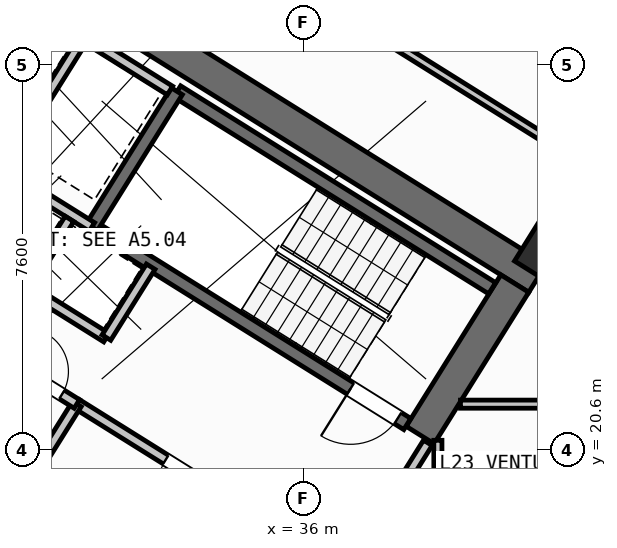
"""IFC4 building model, lengths in metres.
Left out: names, types, materials, properties, quantities, classifications, styles, units other than length and angle.
Written with IfcOpenShell. Run it as: python <this file> out.ifc"""

import sys

from ifc_helpers import new_model, si_unit, direction, frame, frame_2d, origin, origin_2d, place, context, subcontext, project, spatial, rectangle, hollow_rectangle, extrude, source, transform, mapped, element, fill, save


model = new_model("IFC4")
c1 = context("Model", 3, precision=1e-05, world=origin(), true_north=direction((0.0, 1.0)))
c2 = subcontext(c1, "Body", "Model", "MODEL_VIEW")
j1 = project(units=[si_unit("LENGTHUNIT", "METRE"), si_unit("PLANEANGLEUNIT", "RADIAN")], contexts=[c1])
p1 = place(None, origin())
s1 = spatial("IfcSite", under=j1, at=p1, CompositionType="ELEMENT")
p2 = place(p1, origin())
s2 = spatial("IfcBuilding", under=s1, at=p2, CompositionType="ELEMENT")
p3 = place(p2, frame((0.0, 0.0, 93.6)))
s3 = spatial("IfcBuildingStorey", under=s2, at=p3, CompositionType="ELEMENT", Elevation=93.6)
p4 = place(p3, frame((40.615, 23.983, 0.0), z_axis=(0.0, 0.0, 1.0), x_axis=(-0.848045953968, 0.529922692436, 0.0)))
e1 = element("IfcWall", 1, at=p4, inside=s3, PredefinedType="SHEAR", context=c2, shape_type="SweptSolid", body=[
    extrude(rectangle(XDim=13.24, YDim=0.65, at=frame_2d((6.62, 0.0))), origin(), (0.0, 0.0, 1.0), 3.35),
])
p5 = place(p3, frame((40.168, 23.88, 0.0), z_axis=(0.0, 0.0, 1.0), x_axis=(-0.529893103397, -0.8480644427, 0.0)))
e2 = element("IfcWall", 2, at=p5, inside=s3, PredefinedType="SHEAR", context=c2, shape_type="SweptSolid", body=[
    extrude(rectangle(XDim=3.525, YDim=0.65, at=frame_2d((1.763, 0.0))), origin(), (0.0, 0.0, 1.0), 3.35),
])
m1 = source(origin(), c2, "Body", "SweptSolid", [
    extrude(hollow_rectangle(XDim=0.9, YDim=0.9, WallThickness=0.036, at=origin_2d()), origin(), (0.0, 0.0, 1.0), 3.6),
])
p6 = place(p3, frame((40.783, 24.469, 0.0), z_axis=(0.0, 0.0, 1.0), x_axis=(-0.848048096156, 0.529919264233, 0.0)))
e3 = element("IfcColumn", 3, at=p6, inside=s3, PredefinedType="COLUMN", context=c2, shape_type="MappedRepresentation", body=[
    mapped(m1, transform((0.0, 0.0, 0.0), scale=1.0)),
])
p7 = place(p3, frame((31.76, 12.183, 0.0), z_axis=(0.0, 0.0, 1.0), x_axis=(-0.848047074256, 0.529920899612, 0.0)))
e4 = element("IfcWall", 4, at=p7, inside=s3, PredefinedType="STANDARD", context=c2, shape_type="SweptSolid", body=[
    extrude(rectangle(XDim=30.652, YDim=0.32, at=frame_2d((15.326, 0.0))), origin(), (0.0, 0.0, 1.0), 3.35),
])
p8 = place(p7, frame((15.153, 0.0, 0.0)))
e5 = element("IfcOpeningElement", 5, at=p8, cuts=e4, PredefinedType="OPENING", context=c2, shape_type="SweptSolid", body=[
    extrude(rectangle(XDim=1.2, YDim=2.15, at=frame_2d((0.6, 1.075))), frame((0.0, 0.17, 0.0), z_axis=(0.0, -1.0, 0.0), x_axis=(1.0, 0.0, 0.0)), (0.0, 0.0, 1.0), 0.34),
])
p9 = place(p7, frame((2.002, 0.0, 0.8)))
e6 = element("IfcOpeningElement", 6, at=p9, cuts=e4, PredefinedType="OPENING", context=c2, shape_type="SweptSolid", body=[
    extrude(rectangle(XDim=2.1, YDim=1.55, at=frame_2d((1.05, 0.775))), frame((0.0, 0.17, 0.0), z_axis=(0.0, -1.0, 0.0), x_axis=(1.0, 0.0, 0.0)), (0.0, 0.0, 1.0), 0.34),
])
p10 = place(p7, frame((7.206, 0.0, 0.8)))
e7 = element("IfcOpeningElement", 7, at=p10, cuts=e4, PredefinedType="OPENING", context=c2, shape_type="SweptSolid", body=[
    extrude(rectangle(XDim=2.1, YDim=1.55, at=frame_2d((1.05, 0.775))), frame((0.0, 0.17, 0.0), z_axis=(0.0, -1.0, 0.0), x_axis=(1.0, 0.0, 0.0)), (0.0, 0.0, 1.0), 0.34),
])
p11 = place(p7, frame((12.648, 0.0, 1.0)))
e8 = element("IfcOpeningElement", 8, at=p11, cuts=e4, PredefinedType="OPENING", context=c2, shape_type="SweptSolid", body=[
    extrude(rectangle(XDim=0.9, YDim=1.25, at=frame_2d((0.45, 0.625))), frame((0.0, 0.17, 0.0), z_axis=(0.0, -1.0, 0.0), x_axis=(1.0, 0.0, 0.0)), (0.0, 0.0, 1.0), 0.34),
])
p12 = place(p7, frame((27.974, 0.0, 0.95)))
e9 = element("IfcOpeningElement", 9, at=p12, cuts=e4, PredefinedType="OPENING", context=c2, shape_type="SweptSolid", body=[
    extrude(rectangle(XDim=1.2, YDim=1.4, at=frame_2d((0.6, 0.7))), frame((0.0, 0.17, 0.0), z_axis=(0.0, -1.0, 0.0), x_axis=(1.0, 0.0, 0.0)), (0.0, 0.0, 1.0), 0.34),
])
p13 = place(p7, frame((18.347, 0.0, 1.0)))
e10 = element("IfcOpeningElement", 10, at=p13, cuts=e4, PredefinedType="OPENING", context=c2, shape_type="SweptSolid", body=[
    extrude(rectangle(XDim=0.9, YDim=1.25, at=frame_2d((0.45, 0.625))), frame((0.0, 0.17, 0.0), z_axis=(0.0, -1.0, 0.0), x_axis=(1.0, 0.0, 0.0)), (0.0, 0.0, 1.0), 0.34),
])
p14 = place(p7, frame((20.931, 0.0, 1.0)))
e11 = element("IfcOpeningElement", 11, at=p14, cuts=e4, PredefinedType="OPENING", context=c2, shape_type="SweptSolid", body=[
    extrude(rectangle(XDim=0.65, YDim=1.15, at=frame_2d((0.325, 0.575))), frame((0.0, 0.17, 0.0), z_axis=(0.0, -1.0, 0.0), x_axis=(1.0, 0.0, 0.0)), (0.0, 0.0, 1.0), 0.34),
])
p15 = place(p7, frame((22.938, 0.0, 1.0)))
e12 = element("IfcOpeningElement", 12, at=p15, cuts=e4, PredefinedType="OPENING", context=c2, shape_type="SweptSolid", body=[
    extrude(rectangle(XDim=0.9, YDim=1.25, at=frame_2d((0.45, 0.625))), frame((0.0, 0.17, 0.0), z_axis=(0.0, -1.0, 0.0), x_axis=(1.0, 0.0, 0.0)), (0.0, 0.0, 1.0), 0.34),
])
p16 = place(p7, frame((25.069, 0.0, 1.0)))
e13 = element("IfcOpeningElement", 13, at=p16, cuts=e4, PredefinedType="OPENING", context=c2, shape_type="SweptSolid", body=[
    extrude(rectangle(XDim=0.9, YDim=1.25, at=frame_2d((0.45, 0.625))), frame((0.0, 0.17, 0.0), z_axis=(0.0, -1.0, 0.0), x_axis=(1.0, 0.0, 0.0)), (0.0, 0.0, 1.0), 0.34),
])
p17 = place(p3, frame((31.28, 18.261, 0.0), z_axis=(0.0, 0.0, 1.0), x_axis=(-0.848051618787, 0.529913626805, 0.0)))
e14 = element("IfcWall", 14, at=p17, inside=s3, PredefinedType="SHEAR", context=c2, shape_type="SweptSolid", body=[
    extrude(rectangle(XDim=7.46, YDim=0.26, at=frame_2d((3.73, 0.0))), origin(), (0.0, 0.0, 1.0), 3.35),
])
p18 = place(p17, frame((0.36, 0.0, 0.0)))
e15 = element("IfcOpeningElement", 15, at=p18, cuts=e14, PredefinedType="OPENING", context=c2, shape_type="SweptSolid", body=[
    extrude(rectangle(XDim=0.86, YDim=2.05, at=frame_2d((0.43, 1.025))), frame((0.0, 0.14, 0.0), z_axis=(0.0, -1.0, 0.0), x_axis=(1.0, 0.0, 0.0)), (0.0, 0.0, 1.0), 0.28),
])
p19 = place(p3, frame((39.721, 23.788, 0.0), z_axis=(0.0, 0.0, 1.0), x_axis=(-0.848054434086, 0.529909121291, 0.0)))
e16 = element("IfcWall", 16, at=p19, inside=s3, PredefinedType="SHEAR", context=c2, shape_type="SweptSolid", body=[
    extrude(rectangle(XDim=7.33, YDim=0.26, at=frame_2d((3.665, 0.0))), origin(), (0.0, 0.0, 1.0), 3.35),
])
p20 = place(p3, frame((38.046, 21.108, 0.0), z_axis=(0.0, 0.0, 1.0), x_axis=(-0.848054434086, 0.529909121291, 0.0)))
e17 = element("IfcWall", 17, at=p20, inside=s3, PredefinedType="SHEAR", context=c2, shape_type="SweptSolid", body=[
    extrude(rectangle(XDim=7.33, YDim=0.26, at=frame_2d((3.665, 0.0))), origin(), (0.0, 0.0, 1.0), 3.35),
])
p21 = place(p20, frame((0.22, 0.0, 0.0)))
e18 = element("IfcOpeningElement", 18, at=p21, cuts=e17, PredefinedType="OPENING", context=c2, shape_type="SweptSolid", body=[
    extrude(rectangle(XDim=1.1, YDim=2.1, at=frame_2d((0.55, 1.05))), frame((0.0, 0.14, 0.0), z_axis=(0.0, -1.0, 0.0), x_axis=(1.0, 0.0, 0.0)), (0.0, 0.0, 1.0), 0.28),
])
p22 = place(p3, frame((33.496, 27.677, 0.0), z_axis=(0.0, 0.0, 1.0), x_axis=(-0.529908658664, -0.84805472316, 0.0)))
e19 = element("IfcWall", 19, at=p22, inside=s3, PredefinedType="SHEAR", context=c2, shape_type="SweptSolid", body=[
    extrude(rectangle(XDim=3.16, YDim=0.26, at=frame_2d((1.58, 0.0))), origin(), (0.0, 0.0, 1.0), 3.35),
])
p23 = place(p3, frame((36.374, 18.474, 0.0), z_axis=(0.0, 0.0, 1.0), x_axis=(-0.848051071577, 0.529914502535, 0.0)))
e20 = element("IfcWall", 20, at=p23, inside=s3, PredefinedType="STANDARD", context=c2, shape_type="SweptSolid", body=[
    extrude(rectangle(XDim=5.718, YDim=0.2, at=frame_2d((2.859, 0.0))), origin(), (0.0, 0.0, 1.0), 3.34),
])
p24 = place(p23, frame((2.498, 0.0, 0.0)))
e21 = element("IfcOpeningElement", 21, at=p24, cuts=e20, PredefinedType="OPENING", context=c2, shape_type="SweptSolid", body=[
    extrude(rectangle(XDim=1.15, YDim=2.1, at=frame_2d((0.575, 1.05))), frame((0.0, 0.11, 0.0), z_axis=(0.0, -1.0, 0.0), x_axis=(1.0, 0.0, 0.0)), (0.0, 0.0, 1.0), 0.22),
])
p25 = place(p3, frame((31.822, 24.998, 0.0), z_axis=(0.0, 0.0, 1.0), x_axis=(-0.848058348634, 0.529902856485, 0.0)))
e22 = element("IfcWall", 22, at=p25, inside=s3, PredefinedType="STANDARD", context=c2, shape_type="SweptSolid", body=[
    extrude(rectangle(XDim=4.568, YDim=0.2, at=frame_2d((2.284, 0.0))), origin(), (0.0, 0.0, 1.0), 3.34),
])
p26 = place(p3, frame((32.108, 22.814, 0.0), z_axis=(0.0, 0.0, 1.0), x_axis=(-0.848042229521, 0.529928652696, 0.0)))
e23 = element("IfcWall", 23, at=p26, inside=s3, PredefinedType="STANDARD", context=c2, shape_type="SweptSolid", body=[
    extrude(rectangle(XDim=5.62, YDim=0.2, at=frame_2d((2.81, 0.0))), origin(), (0.0, 0.0, 1.0), 3.34),
])
p27 = place(p3, frame((32.982, 24.213, 0.0), z_axis=(0.0, 0.0, 1.0), x_axis=(-0.529839334948, -0.84809803628, 0.0)))
e24 = element("IfcWall", 24, at=p27, inside=s3, PredefinedType="STANDARD", context=c2, shape_type="SweptSolid", body=[
    extrude(rectangle(XDim=1.65, YDim=0.2, at=frame_2d((0.825, 0.0))), origin(), (0.0, 0.0, 1.0), 3.34),
])
p28 = place(p3, frame((31.645, 28.716, 0.0), z_axis=(0.0, 0.0, 1.0), x_axis=(-0.52986693015, -0.848080795876, 0.0)))
e25 = element("IfcWall", 25, at=p28, inside=s3, PredefinedType="STANDARD", context=c2, shape_type="SweptSolid", body=[
    extrude(rectangle(XDim=2.66, YDim=0.2, at=frame_2d((1.33, 0.0))), origin(), (0.0, 0.0, 1.0), 3.34),
])
p29 = place(p3, frame((33.363, 27.69, 0.0), z_axis=(0.0, 0.0, 1.0), x_axis=(-0.848053806312, 0.529910125964, 0.0)))
e26 = element("IfcWall", 26, at=p29, inside=s3, PredefinedType="STANDARD", context=c2, shape_type="SweptSolid", body=[
    extrude(rectangle(XDim=4.448, YDim=0.2, at=frame_2d((2.224, 0.0))), origin(), (0.0, 0.0, 1.0), 3.34),
])
p30 = place(p3, frame((31.379, 25.156, 0.0), z_axis=(0.0, 0.0, 1.0), x_axis=(-0.529998940003, -0.847998304005, 0.0)))
e27 = element("IfcWall", 27, at=p30, inside=s3, PredefinedType="STANDARD", context=c2, shape_type="SweptSolid", body=[
    extrude(rectangle(XDim=1.58, YDim=0.2, at=frame_2d((0.79, 0.0))), origin(), (0.0, 0.0, 1.0), 3.34),
])
p31 = place(p3, frame((31.525, 21.504, 0.0), z_axis=(0.0, 0.0, 1.0), x_axis=(-0.529907497854, -0.848055448493, 0.0)))
e28 = element("IfcWall", 28, at=p31, inside=s3, PredefinedType="STANDARD", context=c2, shape_type="SweptSolid", body=[
    extrude(rectangle(XDim=2.88, YDim=0.2, at=frame_2d((1.44, 0.0))), origin(), (0.0, 0.0, 1.0), 3.34),
])
p32 = place(p3, frame((31.525, 21.504, 0.0), z_axis=(0.0, 0.0, 1.0), x_axis=(-0.848044998614, 0.529924221305, 0.0)))
e29 = element("IfcWall", 29, at=p32, inside=s3, PredefinedType="STANDARD", context=c2, shape_type="SweptSolid", body=[
    extrude(rectangle(XDim=6.168, YDim=0.2, at=frame_2d((3.084, 0.0))), origin(), (0.0, 0.0, 1.0), 3.34),
])
p33 = place(p32, frame((4.4, 0.0, 0.0)))
e30 = element("IfcOpeningElement", 30, at=p33, cuts=e29, PredefinedType="OPENING", context=c2, shape_type="SweptSolid", body=[
    extrude(rectangle(XDim=0.86, YDim=2.05, at=frame_2d((0.43, 1.025))), frame((0.0, 0.11, 0.0), z_axis=(0.0, -1.0, 0.0), x_axis=(1.0, 0.0, 0.0)), (0.0, 0.0, 1.0), 0.22),
])
p34 = place(p32, frame((0.35, 0.0, 0.0)))
e31 = element("IfcOpeningElement", 31, at=p34, cuts=e29, PredefinedType="OPENING", context=c2, shape_type="SweptSolid", body=[
    extrude(rectangle(XDim=0.86, YDim=2.05, at=frame_2d((0.43, 1.025))), frame((0.0, 0.11, 0.0), z_axis=(0.0, -1.0, 0.0), x_axis=(1.0, 0.0, 0.0)), (0.0, 0.0, 1.0), 0.22),
])
p35 = place(p3, frame((41.936, 26.012, 0.0), z_axis=(0.0, 0.0, 1.0), x_axis=(-0.848051154596, 0.529914369676, 0.0)))
e32 = element("IfcWall", 32, at=p35, inside=s3, PredefinedType="PARTITIONING", context=c2, shape_type="SweptSolid", body=[
    extrude(rectangle(XDim=15.57, YDim=0.16, at=frame_2d((7.785, 0.0))), origin(), (0.0, 0.0, 1.0), 3.34),
])
p36 = place(p35, frame((10.83, 0.0, 0.0)))
e33 = element("IfcOpeningElement", 33, at=p36, cuts=e32, PredefinedType="OPENING", context=c2, shape_type="SweptSolid", body=[
    extrude(rectangle(XDim=1.0, YDim=2.1, at=frame_2d((0.5, 1.05))), frame((0.0, 0.09, 0.0), z_axis=(0.0, -1.0, 0.0), x_axis=(1.0, 0.0, 0.0)), (0.0, 0.0, 1.0), 0.18),
])
p37 = place(p3, frame((38.451, 20.737, 0.0), z_axis=(0.0, 0.0, 1.0), x_axis=(-0.529924799939, -0.848044637038, 0.0)))
e34 = element("IfcWall", 34, at=p37, inside=s3, PredefinedType="STANDARD", context=c2, shape_type="SweptSolid", body=[
    extrude(rectangle(XDim=2.96, YDim=0.2, at=frame_2d((1.48, 0.0))), origin(), (0.0, 0.0, 1.0), 3.34),
])
p38 = place(p37, frame((1.46, 0.0, 0.0)))
e35 = element("IfcOpeningElement", 35, at=p38, cuts=e34, PredefinedType="OPENING", context=c2, shape_type="SweptSolid", body=[
    extrude(rectangle(XDim=0.86, YDim=2.05, at=frame_2d((0.43, 1.025))), frame((0.0, 0.11, 0.0), z_axis=(0.0, -1.0, 0.0), x_axis=(1.0, 0.0, 0.0)), (0.0, 0.0, 1.0), 0.22),
])
p39 = place(p3, frame((38.65, 17.93, 0.0), z_axis=(0.0, 0.0, 1.0), x_axis=(0.0, 1.0, 0.0)))
e36 = element("IfcWall", 36, at=p39, inside=s3, PredefinedType="PARTITIONING", context=c2, shape_type="SweptSolid", body=[
    extrude(rectangle(XDim=2.857, YDim=0.16, at=frame_2d((1.428, 0.0))), origin(), (0.0, 0.0, 1.0), 3.34),
])
p40 = place(p3, frame((39.095, 21.5, 0.0), z_axis=(0.0, 0.0, 1.0), x_axis=(1.0, 0.0, 0.0)))
e37 = element("IfcWall", 37, at=p40, inside=s3, PredefinedType="PARTITIONING", context=c2, shape_type="SweptSolid", body=[
    extrude(rectangle(XDim=7.094, YDim=0.16, at=frame_2d((3.547, 0.0))), origin(), (0.0, 0.0, 1.0), 3.34),
])
m2 = source(origin(), c2, "Body", "SweptSolid", [
    extrude(rectangle(XDim=1.1, YDim=2.1, at=frame_2d((0.55, 1.05))), frame((0.0, 0.025, 0.0), z_axis=(0.0, -1.0, 0.0), x_axis=(1.0, 0.0, 0.0)), (0.0, 0.0, 1.0), 0.05),
])
p41 = place(p21, origin())
e38 = element("IfcDoor", 38, at=p41, inside=s3, OperationType="SINGLE_SWING_RIGHT", PredefinedType="DOOR", context=c2, shape_type="MappedRepresentation", body=[
    mapped(m2, transform((0.0, 0.0, 0.0), scale=1.0)),
])
fill(e18, e38)
m3 = source(origin(), c2, "Body", "SweptSolid", [
    extrude(rectangle(XDim=1.15, YDim=2.1, at=frame_2d((0.575, 1.05))), frame((0.0, 0.025, 0.0), z_axis=(0.0, -1.0, 0.0), x_axis=(1.0, 0.0, 0.0)), (0.0, 0.0, 1.0), 0.05),
])
p42 = place(p24, origin())
e39 = element("IfcDoor", 39, at=p42, inside=s3, OperationType="SINGLE_SWING_LEFT", PredefinedType="DOOR", context=c2, shape_type="MappedRepresentation", body=[
    mapped(m3, transform((0.0, 0.0, 0.0), scale=1.0)),
])
fill(e21, e39)
m4 = source(origin(), c2, "Body", "SweptSolid", [
    extrude(rectangle(XDim=0.86, YDim=2.05, at=frame_2d((0.43, 1.025))), frame((0.0, 0.025, 0.0), z_axis=(0.0, -1.0, 0.0), x_axis=(1.0, 0.0, 0.0)), (0.0, 0.0, 1.0), 0.05),
])
p43 = place(p34, frame((0.86, 0.0, 0.0), z_axis=(0.0, 0.0, 1.0), x_axis=(-1.0, 0.0, 0.0)))
e40 = element("IfcDoor", 40, at=p43, inside=s3, OperationType="SINGLE_SWING_LEFT", PredefinedType="DOOR", context=c2, shape_type="MappedRepresentation", body=[
    mapped(m4, transform((0.0, 0.0, 0.0), scale=1.0)),
])
fill(e31, e40)
save(model, sys.argv[1])
